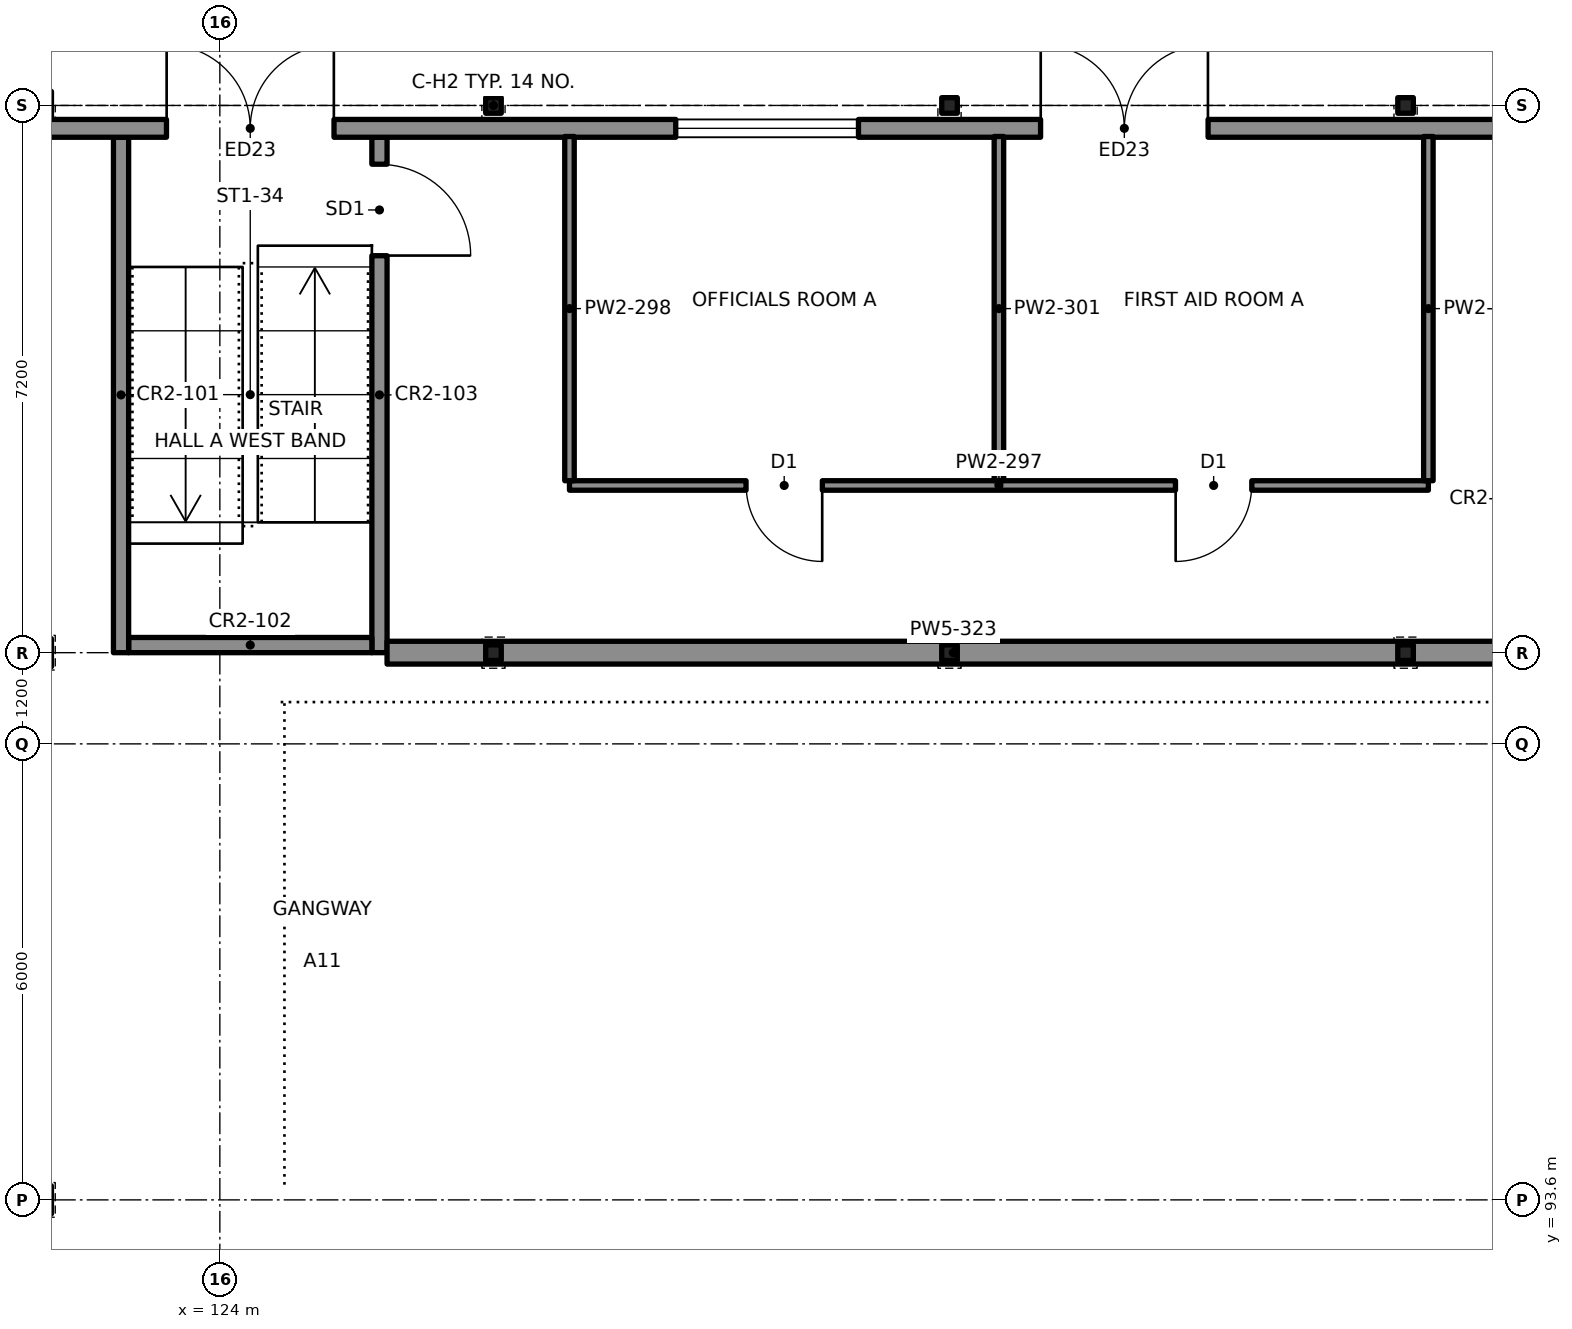
"""IFC4 building model, lengths in metres.
Left out: names, types, materials, properties, quantities, classifications, styles, units other than length and angle.
Written with IfcOpenShell. Run it as: python <this file> out.ifc"""

import sys

from ifc_helpers import new_model, si_unit, direction, frame, frame_2d, origin, origin_2d, place, context, subcontext, project, spatial, rectangle, i_section, extrude, element, fill, save


model = new_model("IFC4")
c1 = context("Model", 3, precision=1e-05, world=origin(), true_north=direction((0.0, 1.0)))
c2 = subcontext(c1, "Body", "Model", "MODEL_VIEW")
j1 = project(units=[si_unit("LENGTHUNIT", "METRE"), si_unit("PLANEANGLEUNIT", "RADIAN")], contexts=[c1])
p1 = place(None, origin())
s1 = spatial("IfcSite", under=j1, at=p1, CompositionType="ELEMENT")
p2 = place(p1, origin())
s2 = spatial("IfcBuilding", under=s1, at=p2, CompositionType="ELEMENT")
p3 = place(p2, origin())
s3 = spatial("IfcBuildingStorey", under=s2, at=p3, CompositionType="ELEMENT", Elevation=0.0)
for number, where, z_axis, x_axis in (
    (1, (127.6, 100.8, -0.5), (0.0, 0.0, 1.0), (1.0, 0.0, 0.0)),
    (2, (127.6, 108.0, -0.5), (0.0, 0.0, 1.0), (1.0, 0.0, 0.0)),
    (3, (133.6, 100.8, -0.5), (0.0, 0.0, 1.0), (1.0, 0.0, 0.0)),
    (4, (133.6, 108.0, -0.5), (0.0, 0.0, 1.0), (1.0, 0.0, 0.0)),
    (5, (139.6, 100.8, -0.5), (0.0, 0.0, 1.0), (1.0, 0.0, 0.0)),
    (6, (139.6, 108.0, -0.5), (0.0, 0.0, 1.0), (1.0, 0.0, 0.0)),
):
    element("IfcColumn", number, at=place(p3, frame(where, z_axis=z_axis, x_axis=x_axis)), inside=s3, PredefinedType="COLUMN", context=c2, shape_type="SweptSolid", body=[
        extrude(i_section(OverallWidth=0.205, OverallDepth=0.31, WebThickness=0.01, FlangeThickness=0.016, at=origin_2d()), origin(), (0.0, 0.0, 1.0), 4.9),
    ])
p4 = place(p3, frame((120.4, 107.699, 0.0), z_axis=(0.0, 0.0, 1.0), x_axis=(1.0, 0.0, 0.0)))
e7 = element("IfcWall", 7, at=p4, inside=s3, PredefinedType="SOLIDWALL", context=c2, shape_type="SweptSolid", body=[
    extrude(rectangle(XDim=50.4, YDim=0.234, at=frame_2d((25.2, 0.0))), origin(), (0.0, 0.0, 1.0), 4.4),
])
p5 = place(p4, frame((9.6, 0.0, 1.0)))
e8 = element("IfcOpeningElement", 8, at=p5, cuts=e7, PredefinedType="OPENING", context=c2, shape_type="SweptSolid", body=[
    extrude(rectangle(XDim=2.4, YDim=2.4, at=frame_2d((1.2, 1.2))), frame((0.0, 0.127, 0.0), z_axis=(0.0, -1.0, 0.0), x_axis=(1.0, 0.0, 0.0)), (0.0, 0.0, 1.0), 0.254),
])
p6 = place(p4, frame((21.6, 0.0, 1.0)))
e9 = element("IfcOpeningElement", 9, at=p6, cuts=e7, PredefinedType="OPENING", context=c2, shape_type="SweptSolid", body=[
    extrude(rectangle(XDim=2.4, YDim=2.4, at=frame_2d((1.2, 1.2))), frame((0.0, 0.127, 0.0), z_axis=(0.0, -1.0, 0.0), x_axis=(1.0, 0.0, 0.0)), (0.0, 0.0, 1.0), 0.254),
])
p7 = place(p4, frame((26.4, 0.0, 1.0)))
e10 = element("IfcOpeningElement", 10, at=p7, cuts=e7, PredefinedType="OPENING", context=c2, shape_type="SweptSolid", body=[
    extrude(rectangle(XDim=2.4, YDim=2.4, at=frame_2d((1.2, 1.2))), frame((0.0, 0.127, 0.0), z_axis=(0.0, -1.0, 0.0), x_axis=(1.0, 0.0, 0.0)), (0.0, 0.0, 1.0), 0.254),
])
p8 = place(p4, frame((38.4, 0.0, 1.0)))
e11 = element("IfcOpeningElement", 11, at=p8, cuts=e7, PredefinedType="OPENING", context=c2, shape_type="SweptSolid", body=[
    extrude(rectangle(XDim=2.4, YDim=2.4, at=frame_2d((1.2, 1.2))), frame((0.0, 0.127, 0.0), z_axis=(0.0, -1.0, 0.0), x_axis=(1.0, 0.0, 0.0)), (0.0, 0.0, 1.0), 0.254),
])
p9 = place(p4, frame((14.4, 0.0, 0.0)))
e12 = element("IfcOpeningElement", 12, at=p9, cuts=e7, PredefinedType="OPENING", context=c2, shape_type="SweptSolid", body=[
    extrude(rectangle(XDim=2.2, YDim=2.4, at=frame_2d((1.1, 1.2))), frame((0.0, 0.127, 0.0), z_axis=(0.0, -1.0, 0.0), x_axis=(1.0, 0.0, 0.0)), (0.0, 0.0, 1.0), 0.254),
])
p10 = place(p4, frame((33.8, 0.0, 0.0)))
e13 = element("IfcOpeningElement", 13, at=p10, cuts=e7, PredefinedType="OPENING", context=c2, shape_type="SweptSolid", body=[
    extrude(rectangle(XDim=2.2, YDim=2.4, at=frame_2d((1.1, 1.2))), frame((0.0, 0.127, 0.0), z_axis=(0.0, -1.0, 0.0), x_axis=(1.0, 0.0, 0.0)), (0.0, 0.0, 1.0), 0.254),
])
p11 = place(p4, frame((2.9, 0.0, 0.0)))
e14 = element("IfcOpeningElement", 14, at=p11, cuts=e7, PredefinedType="OPENING", context=c2, shape_type="SweptSolid", body=[
    extrude(rectangle(XDim=2.2, YDim=2.4, at=frame_2d((1.1, 1.2))), frame((0.0, 0.127, 0.0), z_axis=(0.0, -1.0, 0.0), x_axis=(1.0, 0.0, 0.0)), (0.0, 0.0, 1.0), 0.254),
])
p12 = place(p4, frame((44.9, 0.0, 0.0)))
e15 = element("IfcOpeningElement", 15, at=p12, cuts=e7, PredefinedType="OPENING", context=c2, shape_type="SweptSolid", body=[
    extrude(rectangle(XDim=2.2, YDim=2.4, at=frame_2d((1.1, 1.2))), frame((0.0, 0.127, 0.0), z_axis=(0.0, -1.0, 0.0), x_axis=(1.0, 0.0, 0.0)), (0.0, 0.0, 1.0), 0.254),
])
p13 = place(p3, frame((122.7, 100.8, 0.0), z_axis=(0.0, 0.0, 1.0), x_axis=(0.0, 1.0, 0.0)))
e16 = element("IfcWall", 16, at=p13, inside=s3, PredefinedType="SOLIDWALL", context=c2, shape_type="SweptSolid", body=[
    extrude(rectangle(XDim=6.783, YDim=0.2, at=frame_2d((3.392, 0.0))), origin(), (0.0, 0.0, 1.0), 4.4),
])
p14 = place(p3, frame((126.1, 100.8, 0.0), z_axis=(0.0, 0.0, 1.0), x_axis=(0.0, 1.0, 0.0)))
e17 = element("IfcWall", 17, at=p14, inside=s3, PredefinedType="SOLIDWALL", context=c2, shape_type="SweptSolid", body=[
    extrude(rectangle(XDim=6.783, YDim=0.2, at=frame_2d((3.392, 0.0))), origin(), (0.0, 0.0, 1.0), 4.4),
])
p15 = place(p14, frame((5.225, 0.0, 0.0)))
e18 = element("IfcOpeningElement", 18, at=p15, cuts=e17, PredefinedType="OPENING", context=c2, shape_type="SweptSolid", body=[
    extrude(rectangle(XDim=1.2, YDim=2.1, at=frame_2d((0.6, 1.05))), frame((0.0, 0.11, 0.0), z_axis=(0.0, -1.0, 0.0), x_axis=(1.0, 0.0, 0.0)), (0.0, 0.0, 1.0), 0.22),
])
p16 = place(p3, frame((122.8, 100.9, 0.0), z_axis=(0.0, 0.0, 1.0), x_axis=(1.0, 0.0, 0.0)))
e19 = element("IfcWall", 19, at=p16, inside=s3, PredefinedType="SOLIDWALL", context=c2, shape_type="SweptSolid", body=[
    extrude(rectangle(XDim=3.2, YDim=0.2, at=frame_2d((1.6, 0.0))), origin(), (0.0, 0.0, 1.0), 4.4),
])
p17 = place(p3, frame((126.2, 100.8, 0.0), z_axis=(0.0, 0.0, 1.0), x_axis=(1.0, 0.0, 0.0)))
e20 = element("IfcWall", 20, at=p17, inside=s3, PredefinedType="PARTITIONING", context=c2, shape_type="SweptSolid", body=[
    extrude(rectangle(XDim=14.9, YDim=0.3, at=frame_2d((7.45, 0.0))), origin(), (0.0, 0.0, 1.0), 3.8),
])
p18 = place(p3, frame((128.6, 103.0, 0.0), z_axis=(0.0, 0.0, 1.0), x_axis=(1.0, 0.0, 0.0)))
e21 = element("IfcWall", 21, at=p18, inside=s3, PredefinedType="PARTITIONING", context=c2, shape_type="SweptSolid", body=[
    extrude(rectangle(XDim=11.3, YDim=0.125, at=frame_2d((5.65, 0.0))), origin(), (0.0, 0.0, 1.0), 3.65),
])
p19 = place(p18, frame((2.325, 0.0, 0.0)))
e22 = element("IfcOpeningElement", 22, at=p19, cuts=e21, PredefinedType="OPENING", context=c2, shape_type="SweptSolid", body=[
    extrude(rectangle(XDim=1.0, YDim=2.1, at=frame_2d((0.5, 1.05))), frame((0.0, 0.073, 0.0), z_axis=(0.0, -1.0, 0.0), x_axis=(1.0, 0.0, 0.0)), (0.0, 0.0, 1.0), 0.145),
])
p20 = place(p18, frame((7.975, 0.0, 0.0)))
e23 = element("IfcOpeningElement", 23, at=p20, cuts=e21, PredefinedType="OPENING", context=c2, shape_type="SweptSolid", body=[
    extrude(rectangle(XDim=1.0, YDim=2.1, at=frame_2d((0.5, 1.05))), frame((0.0, 0.073, 0.0), z_axis=(0.0, -1.0, 0.0), x_axis=(1.0, 0.0, 0.0)), (0.0, 0.0, 1.0), 0.145),
])
for number, where, z_axis, x_axis in (
    (24, (128.6, 103.062, 0.0), (0.0, 0.0, 1.0), (0.0, 1.0, 0.0)),
    (25, (134.25, 103.062, 0.0), (0.0, 0.0, 1.0), (0.0, 1.0, 0.0)),
    (26, (139.9, 103.062, 0.0), (0.0, 0.0, 1.0), (0.0, 1.0, 0.0)),
):
    element("IfcWall", number, at=place(p3, frame(where, z_axis=z_axis, x_axis=x_axis)), inside=s3, PredefinedType="PARTITIONING", context=c2, shape_type="SweptSolid", body=[
        extrude(rectangle(XDim=4.529, YDim=0.125, at=frame_2d((2.265, 0.0))), origin(), (0.0, 0.0, 1.0), 3.65),
    ])
p21 = place(p5, origin())
e27 = element("IfcWindow", 27, at=p21, inside=s3, PartitioningType="SINGLE_PANEL", PredefinedType="WINDOW", context=c2, shape_type="SweptSolid", body=[
    extrude(rectangle(XDim=2.4, YDim=2.4, at=frame_2d((1.2, 1.2))), frame((0.0, 0.03, 0.0), z_axis=(0.0, -1.0, 0.0), x_axis=(1.0, 0.0, 0.0)), (0.0, 0.0, 1.0), 0.06),
])
fill(e8, e27)
p22 = place(p9, origin())
e28 = element("IfcDoor", 28, at=p22, inside=s3, OperationType="DOUBLE_DOOR_SINGLE_SWING", PredefinedType="DOOR", context=c2, shape_type="SweptSolid", body=[
    extrude(rectangle(XDim=2.2, YDim=2.4, at=frame_2d((1.1, 1.2))), frame((0.0, 0.025, 0.0), z_axis=(0.0, -1.0, 0.0), x_axis=(1.0, 0.0, 0.0)), (0.0, 0.0, 1.0), 0.05),
])
fill(e12, e28)
p23 = place(p11, origin())
e29 = element("IfcDoor", 29, at=p23, inside=s3, OperationType="DOUBLE_DOOR_SINGLE_SWING", PredefinedType="DOOR", context=c2, shape_type="SweptSolid", body=[
    extrude(rectangle(XDim=2.2, YDim=2.4, at=frame_2d((1.1, 1.2))), frame((0.0, 0.025, 0.0), z_axis=(0.0, -1.0, 0.0), x_axis=(1.0, 0.0, 0.0)), (0.0, 0.0, 1.0), 0.05),
])
fill(e14, e29)
p24 = place(p15, origin())
e30 = element("IfcDoor", 30, at=p24, inside=s3, OperationType="SINGLE_SWING_LEFT", PredefinedType="DOOR", context=c2, shape_type="SweptSolid", body=[
    extrude(rectangle(XDim=1.2, YDim=2.1, at=frame_2d((0.6, 1.05))), frame((0.0, 0.025, 0.0), z_axis=(0.0, -1.0, 0.0), x_axis=(1.0, 0.0, 0.0)), (0.0, 0.0, 1.0), 0.05),
])
fill(e18, e30)
p25 = place(p19, origin())
e31 = element("IfcDoor", 31, at=p25, inside=s3, OperationType="SINGLE_SWING_RIGHT", PredefinedType="DOOR", context=c2, shape_type="SweptSolid", body=[
    extrude(rectangle(XDim=1.0, YDim=2.1, at=frame_2d((0.5, 1.05))), frame((0.0, 0.025, 0.0), z_axis=(0.0, -1.0, 0.0), x_axis=(1.0, 0.0, 0.0)), (0.0, 0.0, 1.0), 0.05),
])
fill(e22, e31)
p26 = place(p20, origin())
e32 = element("IfcDoor", 32, at=p26, inside=s3, OperationType="SINGLE_SWING_LEFT", PredefinedType="DOOR", context=c2, shape_type="SweptSolid", body=[
    extrude(rectangle(XDim=1.0, YDim=2.1, at=frame_2d((0.5, 1.05))), frame((0.0, 0.025, 0.0), z_axis=(0.0, -1.0, 0.0), x_axis=(1.0, 0.0, 0.0)), (0.0, 0.0, 1.0), 0.05),
])
fill(e23, e32)
save(model, sys.argv[1])
